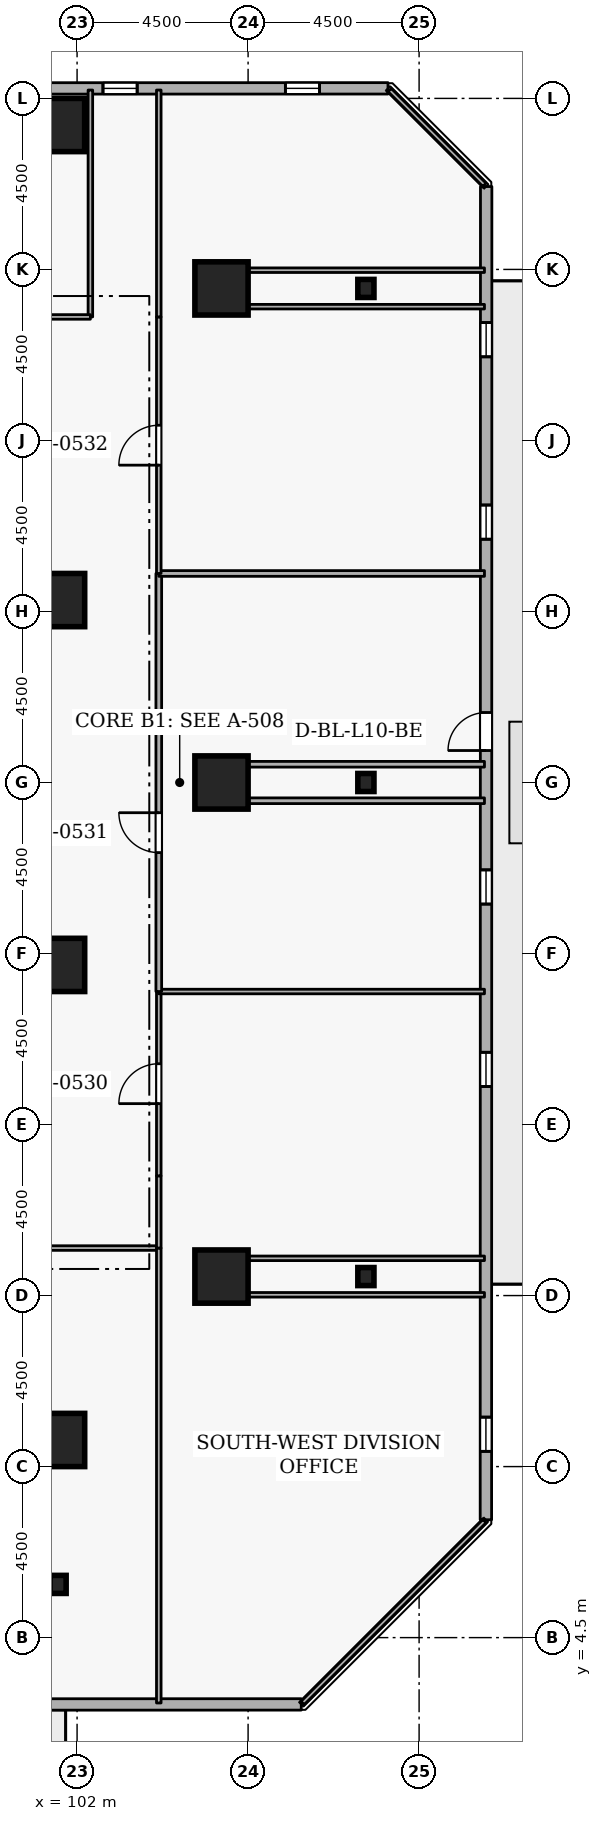
"""IFC4 building model, lengths in metres.
Left out: names, types, materials, properties, quantities, classifications, styles, units other than length and angle.
Written with IfcOpenShell. Run it as: python <this file> out.ifc"""

import sys

from ifc_helpers import new_model, si_unit, direction, frame, frame_2d, origin, origin_2d, place, context, subcontext, project, spatial, rectangle, i_section, extrude, element, fill, save


model = new_model("IFC4")
c1 = context("Model", 3, precision=1e-05, world=origin(), true_north=direction((0.0, 1.0)))
c2 = subcontext(c1, "Body", "Model", "MODEL_VIEW")
j1 = project(units=[si_unit("LENGTHUNIT", "METRE"), si_unit("PLANEANGLEUNIT", "RADIAN")], contexts=[c1])
p1 = place(None, origin())
s1 = spatial("IfcSite", under=j1, at=p1, CompositionType="ELEMENT")
p2 = place(p1, origin())
s2 = spatial("IfcBuilding", under=s1, at=p2, CompositionType="ELEMENT")
p3 = place(p2, frame((0.0, 0.0, 42.3)))
s3 = spatial("IfcBuildingStorey", under=s2, at=p3, CompositionType="ELEMENT", Elevation=42.3)
for number, where, z_axis, x_axis in (
    (1, (105.8, 14.0, 0.0), (0.0, 0.0, 1.0), (1.0, 0.0, 0.0)),
    (2, (105.8, 27.0, 0.0), (0.0, 0.0, 1.0), (1.0, 0.0, 0.0)),
    (3, (105.8, 40.0, 0.0), (0.0, 0.0, 1.0), (1.0, 0.0, 0.0)),
    (4, (101.5, 44.3, 0.0), (0.0, 0.0, 1.0), (1.0, 0.0, 0.0)),
    (5, (101.5, 9.7, 0.0), (0.0, 0.0, 1.0), (1.0, 0.0, 0.0)),
    (6, (101.5, 22.2, 0.0), (0.0, 0.0, 1.0), (1.0, 0.0, 0.0)),
    (7, (101.5, 31.8, 0.0), (0.0, 0.0, 1.0), (1.0, 0.0, 0.0)),
):
    element("IfcColumn", number, at=place(p3, frame(where, z_axis=z_axis, x_axis=x_axis)), inside=s3, PredefinedType="COLUMN", context=c2, shape_type="SweptSolid", body=[
        extrude(rectangle(XDim=1.4, YDim=1.4, at=origin_2d()), origin(), (0.0, 0.0, 1.0), 3.6),
    ])
for number, where, z_axis, x_axis in (
    (8, (109.6, 14.0, 0.0), (0.0, 0.0, 1.0), (1.0, 0.0, 0.0)),
    (9, (109.6, 27.0, 0.0), (0.0, 0.0, 1.0), (1.0, 0.0, 0.0)),
    (10, (109.6, 40.0, 0.0), (0.0, 0.0, 1.0), (1.0, 0.0, 0.0)),
    (11, (101.5, 5.9, 0.0), (0.0, 0.0, 1.0), (1.0, 0.0, 0.0)),
):
    element("IfcColumn", number, at=place(p3, frame(where, z_axis=z_axis, x_axis=x_axis)), inside=s3, PredefinedType="COLUMN", context=c2, shape_type="SweptSolid", body=[
        extrude(i_section(OverallWidth=0.424, OverallDepth=0.475, WebThickness=0.048, FlangeThickness=0.077, FilletRadius=0.015, at=origin_2d()), origin(), (0.0, 0.0, 1.0), 3.6),
    ])
p4 = place(p3, frame((72.819, 2.735, 0.0), z_axis=(0.0, 0.0, 1.0), x_axis=(0.999999978205, 0.000208784245, 0.0)))
e12 = element("IfcWall", 12, at=p4, inside=s3, PredefinedType="STANDARD", context=c2, shape_type="SweptSolid", body=[
    extrude(rectangle(XDim=35.08, YDim=0.3, at=frame_2d((17.54, 0.0))), origin(), (0.0, 0.0, 1.0), 2.7),
])
p5 = place(p4, frame((19.34, 0.0, 0.0)))
e13 = element("IfcOpeningElement", 13, at=p5, cuts=e12, PredefinedType="OPENING", context=c2, shape_type="SweptSolid", body=[
    extrude(rectangle(XDim=1.0, YDim=2.08, at=frame_2d((0.5, 1.04))), frame((0.0, 0.16, 0.0), z_axis=(0.0, -1.0, 0.0), x_axis=(1.0, 0.0, 0.0)), (0.0, 0.0, 1.0), 0.32),
])
p6 = place(p4, frame((1.8, 0.0, 0.72)))
e14 = element("IfcOpeningElement", 14, at=p6, cuts=e12, PredefinedType="OPENING", context=c2, shape_type="SweptSolid", body=[
    extrude(rectangle(XDim=0.9, YDim=1.75, at=frame_2d((0.45, 0.875))), frame((0.0, 0.16, 0.0), z_axis=(0.0, -1.0, 0.0), x_axis=(1.0, 0.0, 0.0)), (0.0, 0.0, 1.0), 0.32),
])
p7 = place(p4, frame((6.6, 0.0, 0.72)))
e15 = element("IfcOpeningElement", 15, at=p7, cuts=e12, PredefinedType="OPENING", context=c2, shape_type="SweptSolid", body=[
    extrude(rectangle(XDim=0.9, YDim=1.75, at=frame_2d((0.45, 0.875))), frame((0.0, 0.16, 0.0), z_axis=(0.0, -1.0, 0.0), x_axis=(1.0, 0.0, 0.0)), (0.0, 0.0, 1.0), 0.32),
])
p8 = place(p4, frame((11.4, 0.0, 0.72)))
e16 = element("IfcOpeningElement", 16, at=p8, cuts=e12, PredefinedType="OPENING", context=c2, shape_type="SweptSolid", body=[
    extrude(rectangle(XDim=0.9, YDim=1.75, at=frame_2d((0.45, 0.875))), frame((0.0, 0.16, 0.0), z_axis=(0.0, -1.0, 0.0), x_axis=(1.0, 0.0, 0.0)), (0.0, 0.0, 1.0), 0.32),
])
p9 = place(p4, frame((16.2, 0.0, 0.72)))
e17 = element("IfcOpeningElement", 17, at=p9, cuts=e12, PredefinedType="OPENING", context=c2, shape_type="SweptSolid", body=[
    extrude(rectangle(XDim=0.9, YDim=1.75, at=frame_2d((0.45, 0.875))), frame((0.0, 0.16, 0.0), z_axis=(0.0, -1.0, 0.0), x_axis=(1.0, 0.0, 0.0)), (0.0, 0.0, 1.0), 0.32),
])
p10 = place(p4, frame((25.8, 0.0, 0.72)))
e18 = element("IfcOpeningElement", 18, at=p10, cuts=e12, PredefinedType="OPENING", context=c2, shape_type="SweptSolid", body=[
    extrude(rectangle(XDim=0.9, YDim=1.75, at=frame_2d((0.45, 0.875))), frame((0.0, 0.16, 0.0), z_axis=(0.0, -1.0, 0.0), x_axis=(1.0, 0.0, 0.0)), (0.0, 0.0, 1.0), 0.32),
])
p11 = place(p3, frame((112.758, 7.601, 0.0), z_axis=(0.0, 0.0, 1.0), x_axis=(0.000208784245, 0.999999978205, 0.0)))
e19 = element("IfcWall", 19, at=p11, inside=s3, PredefinedType="STANDARD", context=c2, shape_type="SweptSolid", body=[
    extrude(rectangle(XDim=35.08, YDim=0.3, at=frame_2d((17.54, 0.0))), origin(), (0.0, 0.0, 1.0), 2.7),
])
p12 = place(p11, frame((20.24, 0.0, 0.0)))
e20 = element("IfcOpeningElement", 20, at=p12, cuts=e19, PredefinedType="OPENING", context=c2, shape_type="SweptSolid", body=[
    extrude(rectangle(XDim=1.0, YDim=2.08, at=frame_2d((0.5, 1.04))), frame((0.0, 0.16, 0.0), z_axis=(0.0, -1.0, 0.0), x_axis=(1.0, 0.0, 0.0)), (0.0, 0.0, 1.0), 0.32),
])
p13 = place(p11, frame((1.8, 0.0, 0.72)))
e21 = element("IfcOpeningElement", 21, at=p13, cuts=e19, PredefinedType="OPENING", context=c2, shape_type="SweptSolid", body=[
    extrude(rectangle(XDim=0.9, YDim=1.75, at=frame_2d((0.45, 0.875))), frame((0.0, 0.16, 0.0), z_axis=(0.0, -1.0, 0.0), x_axis=(1.0, 0.0, 0.0)), (0.0, 0.0, 1.0), 0.32),
])
p14 = place(p11, frame((11.4, 0.0, 0.72)))
e22 = element("IfcOpeningElement", 22, at=p14, cuts=e19, PredefinedType="OPENING", context=c2, shape_type="SweptSolid", body=[
    extrude(rectangle(XDim=0.9, YDim=1.75, at=frame_2d((0.45, 0.875))), frame((0.0, 0.16, 0.0), z_axis=(0.0, -1.0, 0.0), x_axis=(1.0, 0.0, 0.0)), (0.0, 0.0, 1.0), 0.32),
])
p15 = place(p11, frame((16.2, 0.0, 0.72)))
e23 = element("IfcOpeningElement", 23, at=p15, cuts=e19, PredefinedType="OPENING", context=c2, shape_type="SweptSolid", body=[
    extrude(rectangle(XDim=0.9, YDim=1.75, at=frame_2d((0.45, 0.875))), frame((0.0, 0.16, 0.0), z_axis=(0.0, -1.0, 0.0), x_axis=(1.0, 0.0, 0.0)), (0.0, 0.0, 1.0), 0.32),
])
p16 = place(p11, frame((25.8, 0.0, 0.72)))
e24 = element("IfcOpeningElement", 24, at=p16, cuts=e19, PredefinedType="OPENING", context=c2, shape_type="SweptSolid", body=[
    extrude(rectangle(XDim=0.9, YDim=1.75, at=frame_2d((0.45, 0.875))), frame((0.0, 0.16, 0.0), z_axis=(0.0, -1.0, 0.0), x_axis=(1.0, 0.0, 0.0)), (0.0, 0.0, 1.0), 0.32),
])
p17 = place(p11, frame((30.6, 0.0, 0.72)))
e25 = element("IfcOpeningElement", 25, at=p17, cuts=e19, PredefinedType="OPENING", context=c2, shape_type="SweptSolid", body=[
    extrude(rectangle(XDim=0.9, YDim=1.75, at=frame_2d((0.45, 0.875))), frame((0.0, 0.16, 0.0), z_axis=(0.0, -1.0, 0.0), x_axis=(1.0, 0.0, 0.0)), (0.0, 0.0, 1.0), 0.32),
])
p18 = place(p3, frame((110.181, 45.265, 0.0), z_axis=(0.0, 0.0, 1.0), x_axis=(-0.999999978205, -0.000208784245, 0.0)))
e26 = element("IfcWall", 26, at=p18, inside=s3, PredefinedType="STANDARD", context=c2, shape_type="SweptSolid", body=[
    extrude(rectangle(XDim=35.08, YDim=0.3, at=frame_2d((17.54, 0.0))), origin(), (0.0, 0.0, 1.0), 2.7),
])
p19 = place(p18, frame((1.8, 0.0, 0.72)))
e27 = element("IfcOpeningElement", 27, at=p19, cuts=e26, PredefinedType="OPENING", context=c2, shape_type="SweptSolid", body=[
    extrude(rectangle(XDim=0.9, YDim=1.75, at=frame_2d((0.45, 0.875))), frame((0.0, 0.16, 0.0), z_axis=(0.0, -1.0, 0.0), x_axis=(1.0, 0.0, 0.0)), (0.0, 0.0, 1.0), 0.32),
])
p20 = place(p18, frame((6.6, 0.0, 0.72)))
e28 = element("IfcOpeningElement", 28, at=p20, cuts=e26, PredefinedType="OPENING", context=c2, shape_type="SweptSolid", body=[
    extrude(rectangle(XDim=0.9, YDim=1.75, at=frame_2d((0.45, 0.875))), frame((0.0, 0.16, 0.0), z_axis=(0.0, -1.0, 0.0), x_axis=(1.0, 0.0, 0.0)), (0.0, 0.0, 1.0), 0.32),
])
p21 = place(p18, frame((11.4, 0.0, 0.72)))
e29 = element("IfcOpeningElement", 29, at=p21, cuts=e26, PredefinedType="OPENING", context=c2, shape_type="SweptSolid", body=[
    extrude(rectangle(XDim=0.9, YDim=1.75, at=frame_2d((0.45, 0.875))), frame((0.0, 0.16, 0.0), z_axis=(0.0, -1.0, 0.0), x_axis=(1.0, 0.0, 0.0)), (0.0, 0.0, 1.0), 0.32),
])
p22 = place(p18, frame((16.2, 0.0, 0.72)))
e30 = element("IfcOpeningElement", 30, at=p22, cuts=e26, PredefinedType="OPENING", context=c2, shape_type="SweptSolid", body=[
    extrude(rectangle(XDim=0.9, YDim=1.75, at=frame_2d((0.45, 0.875))), frame((0.0, 0.16, 0.0), z_axis=(0.0, -1.0, 0.0), x_axis=(1.0, 0.0, 0.0)), (0.0, 0.0, 1.0), 0.32),
])
p23 = place(p18, frame((25.8, 0.0, 0.72)))
e31 = element("IfcOpeningElement", 31, at=p23, cuts=e26, PredefinedType="OPENING", context=c2, shape_type="SweptSolid", body=[
    extrude(rectangle(XDim=0.9, YDim=1.75, at=frame_2d((0.45, 0.875))), frame((0.0, 0.16, 0.0), z_axis=(0.0, -1.0, 0.0), x_axis=(1.0, 0.0, 0.0)), (0.0, 0.0, 1.0), 0.32),
])
p24 = place(p18, frame((30.6, 0.0, 0.72)))
e32 = element("IfcOpeningElement", 32, at=p24, cuts=e26, PredefinedType="OPENING", context=c2, shape_type="SweptSolid", body=[
    extrude(rectangle(XDim=0.9, YDim=1.75, at=frame_2d((0.45, 0.875))), frame((0.0, 0.16, 0.0), z_axis=(0.0, -1.0, 0.0), x_axis=(1.0, 0.0, 0.0)), (0.0, 0.0, 1.0), 0.32),
])
p25 = place(p3, frame((94.8, 14.75, 0.0), z_axis=(0.0, 0.0, 1.0), x_axis=(1.0, 0.0, 0.0)))
e33 = element("IfcWall", 33, at=p25, inside=s3, PredefinedType="PARTITIONING", context=c2, shape_type="SweptSolid", body=[
    extrude(rectangle(XDim=9.35, YDim=0.12, at=frame_2d((4.675, 0.0))), origin(), (0.0, 0.0, 1.0), 3.34),
])
p26 = place(p25, frame((4.15, 0.0, 0.0)))
e34 = element("IfcOpeningElement", 34, at=p26, cuts=e33, PredefinedType="OPENING", context=c2, shape_type="SweptSolid", body=[
    extrude(rectangle(XDim=1.05, YDim=2.1, at=frame_2d((0.525, 1.05))), frame((0.0, 0.07, 0.0), z_axis=(0.0, -1.0, 0.0), x_axis=(1.0, 0.0, 0.0)), (0.0, 0.0, 1.0), 0.14),
])
p27 = place(p3, frame((104.15, 14.75, 0.0), z_axis=(0.0, 0.0, 1.0), x_axis=(0.0, -1.0, 0.0)))
e35 = element("IfcWall", 35, at=p27, inside=s3, PredefinedType="PARTITIONING", context=c2, shape_type="SweptSolid", body=[
    extrude(rectangle(XDim=11.97, YDim=0.12, at=frame_2d((5.985, 0.0))), origin(), (0.0, 0.0, 1.0), 3.34),
])
p28 = place(p3, frame((102.35, 45.22, 0.0), z_axis=(0.0, 0.0, 1.0), x_axis=(0.0, -1.0, 0.0)))
e36 = element("IfcWall", 36, at=p28, inside=s3, PredefinedType="PARTITIONING", context=c2, shape_type="SweptSolid", body=[
    extrude(rectangle(XDim=5.97, YDim=0.12, at=frame_2d((2.985, 0.0))), origin(), (0.0, 0.0, 1.0), 3.34),
])
p29 = place(p3, frame((102.35, 39.25, 0.0), z_axis=(0.0, 0.0, 1.0), x_axis=(-1.0, 0.0, 0.0)))
e37 = element("IfcWall", 37, at=p29, inside=s3, PredefinedType="PARTITIONING", context=c2, shape_type="SweptSolid", body=[
    extrude(rectangle(XDim=1.862, YDim=0.12, at=frame_2d((0.931, 0.0))), origin(), (0.0, 0.0, 1.0), 3.34),
])
p30 = place(p3, frame((104.15, 14.75, 0.0), z_axis=(0.0, 0.0, 1.0), x_axis=(0.0, 1.0, 0.0)))
e38 = element("IfcWall", 38, at=p30, inside=s3, PredefinedType="PARTITIONING", context=c2, shape_type="SweptSolid", body=[
    extrude(rectangle(XDim=1.9, YDim=0.12, at=frame_2d((0.95, 0.0))), origin(), (0.0, 0.0, 1.0), 3.34),
])
p31 = place(p3, frame((104.15, 16.65, 0.0), z_axis=(0.0, 0.0, 1.0), x_axis=(0.0, 1.0, 0.0)))
e39 = element("IfcWall", 39, at=p31, inside=s3, PredefinedType="PARTITIONING", context=c2, shape_type="SweptSolid", body=[
    extrude(rectangle(XDim=4.85, YDim=0.12, at=frame_2d((2.425, 0.0))), origin(), (0.0, 0.0, 1.0), 3.34),
])
p32 = place(p31, frame((1.9, 0.0, 0.0)))
e40 = element("IfcOpeningElement", 40, at=p32, cuts=e39, PredefinedType="OPENING", context=c2, shape_type="SweptSolid", body=[
    extrude(rectangle(XDim=1.05, YDim=2.1, at=frame_2d((0.525, 1.05))), frame((0.0, 0.07, 0.0), z_axis=(0.0, -1.0, 0.0), x_axis=(1.0, 0.0, 0.0)), (0.0, 0.0, 1.0), 0.14),
])
p33 = place(p3, frame((104.15, 21.5, 0.0), z_axis=(0.0, 0.0, 1.0), x_axis=(1.0, 0.0, 0.0)))
e41 = element("IfcWall", 41, at=p33, inside=s3, PredefinedType="PARTITIONING", context=c2, shape_type="SweptSolid", body=[
    extrude(rectangle(XDim=8.57, YDim=0.12, at=frame_2d((4.285, 0.0))), origin(), (0.0, 0.0, 1.0), 3.34),
])
p34 = place(p3, frame((112.72, 14.48, 0.0), z_axis=(0.0, 0.0, 1.0), x_axis=(-1.0, 0.0, 0.0)))
e42 = element("IfcWall", 42, at=p34, inside=s3, PredefinedType="PARTITIONING", context=c2, shape_type="SweptSolid", body=[
    extrude(rectangle(XDim=6.92, YDim=0.12, at=frame_2d((3.46, 0.0))), origin(), (0.0, 0.0, 1.0), 3.34),
])
p35 = place(p3, frame((105.8, 13.52, 0.0), z_axis=(0.0, 0.0, 1.0), x_axis=(1.0, 0.0, 0.0)))
e43 = element("IfcWall", 43, at=p35, inside=s3, PredefinedType="PARTITIONING", context=c2, shape_type="SweptSolid", body=[
    extrude(rectangle(XDim=6.92, YDim=0.12, at=frame_2d((3.46, 0.0))), origin(), (0.0, 0.0, 1.0), 2.895),
])
p36 = place(p3, frame((112.72, 7.566, 0.0), z_axis=(0.0, 0.0, 1.0), x_axis=(-0.707106781187, -0.707106781187, 0.0)))
e44 = element("IfcWall", 44, at=p36, inside=s3, PredefinedType="PARTITIONING", context=c2, shape_type="SweptSolid", body=[
    extrude(rectangle(XDim=6.768, YDim=0.12, at=frame_2d((3.384, 0.0))), origin(), (0.0, 0.0, 1.0), 3.34),
])
p37 = place(p3, frame((104.15, 21.5, 0.0), z_axis=(0.0, 0.0, 1.0), x_axis=(0.0, 1.0, 0.0)))
e45 = element("IfcWall", 45, at=p37, inside=s3, PredefinedType="PARTITIONING", context=c2, shape_type="SweptSolid", body=[
    extrude(rectangle(XDim=11.0, YDim=0.15, at=frame_2d((5.5, 0.0))), origin(), (0.0, 0.0, 1.0), 3.34),
])
p38 = place(p37, frame((3.655, 0.0, 0.0)))
e46 = element("IfcOpeningElement", 46, at=p38, cuts=e45, PredefinedType="OPENING", context=c2, shape_type="SweptSolid", body=[
    extrude(rectangle(XDim=1.05, YDim=2.1, at=frame_2d((0.525, 1.05))), frame((0.0, 0.085, 0.0), z_axis=(0.0, -1.0, 0.0), x_axis=(1.0, 0.0, 0.0)), (0.0, 0.0, 1.0), 0.17),
])
p39 = place(p3, frame((104.15, 32.5, 0.0), z_axis=(0.0, 0.0, 1.0), x_axis=(1.0, 0.0, 0.0)))
e47 = element("IfcWall", 47, at=p39, inside=s3, PredefinedType="PARTITIONING", context=c2, shape_type="SweptSolid", body=[
    extrude(rectangle(XDim=8.57, YDim=0.15, at=frame_2d((4.285, 0.0))), origin(), (0.0, 0.0, 1.0), 3.34),
])
for number, where, z_axis, x_axis in (
    (48, (112.72, 27.48, 0.0), (0.0, 0.0, 1.0), (-1.0, 0.0, 0.0)),
    (49, (105.8, 26.52, 0.0), (0.0, 0.0, 1.0), (1.0, 0.0, 0.0)),
):
    element("IfcWall", number, at=place(p3, frame(where, z_axis=z_axis, x_axis=x_axis)), inside=s3, PredefinedType="PARTITIONING", context=c2, shape_type="SweptSolid", body=[
        extrude(rectangle(XDim=6.92, YDim=0.15, at=frame_2d((3.46, 0.0))), origin(), (0.0, 0.0, 1.0), 3.34),
    ])
p40 = place(p3, frame((104.15, 32.5, 0.0), z_axis=(0.0, 0.0, 1.0), x_axis=(0.0, 1.0, 0.0)))
e50 = element("IfcWall", 50, at=p40, inside=s3, PredefinedType="PARTITIONING", context=c2, shape_type="SweptSolid", body=[
    extrude(rectangle(XDim=6.75, YDim=0.12, at=frame_2d((3.375, 0.0))), origin(), (0.0, 0.0, 1.0), 3.34),
])
p41 = place(p40, frame((2.85, 0.0, 0.0)))
e51 = element("IfcOpeningElement", 51, at=p41, cuts=e50, PredefinedType="OPENING", context=c2, shape_type="SweptSolid", body=[
    extrude(rectangle(XDim=1.05, YDim=2.1, at=frame_2d((0.525, 1.05))), frame((0.0, 0.07, 0.0), z_axis=(0.0, -1.0, 0.0), x_axis=(1.0, 0.0, 0.0)), (0.0, 0.0, 1.0), 0.14),
])
p42 = place(p3, frame((104.15, 39.25, 0.0), z_axis=(0.0, 0.0, 1.0), x_axis=(0.0, 1.0, 0.0)))
e52 = element("IfcWall", 52, at=p42, inside=s3, PredefinedType="PARTITIONING", context=c2, shape_type="SweptSolid", body=[
    extrude(rectangle(XDim=5.97, YDim=0.12, at=frame_2d((2.985, 0.0))), origin(), (0.0, 0.0, 1.0), 3.34),
])
p43 = place(p3, frame((110.225, 45.22, 0.0), z_axis=(0.0, 0.0, 1.0), x_axis=(0.707106781187, -0.707106781187, 0.0)))
e53 = element("IfcWall", 53, at=p43, inside=s3, PredefinedType="PARTITIONING", context=c2, shape_type="SweptSolid", body=[
    extrude(rectangle(XDim=3.528, YDim=0.12, at=frame_2d((1.764, 0.0))), origin(), (0.0, 0.0, 1.0), 3.34),
])
for number, where, z_axis, x_axis in (
    (54, (112.72, 40.48, 0.0), (0.0, 0.0, 1.0), (-1.0, 0.0, 0.0)),
    (55, (105.8, 39.52, 0.0), (0.0, 0.0, 1.0), (1.0, 0.0, 0.0)),
):
    element("IfcWall", number, at=place(p3, frame(where, z_axis=z_axis, x_axis=x_axis)), inside=s3, PredefinedType="PARTITIONING", context=c2, shape_type="SweptSolid", body=[
        extrude(rectangle(XDim=6.92, YDim=0.12, at=frame_2d((3.46, 0.0))), origin(), (0.0, 0.0, 1.0), 3.34),
    ])
p44 = place(p12, origin())
e56 = element("IfcDoor", 56, at=p44, inside=s3, OperationType="SINGLE_SWING_LEFT", PredefinedType="DOOR", context=c2, shape_type="SweptSolid", body=[
    extrude(rectangle(XDim=1.0, YDim=2.08, at=frame_2d((0.5, 1.04))), frame((0.0, 0.025, 0.0), z_axis=(0.0, -1.0, 0.0), x_axis=(1.0, 0.0, 0.0)), (0.0, 0.0, 1.0), 0.05),
])
fill(e20, e56)
p45 = place(p13, origin())
e57 = element("IfcWindow", 57, at=p45, inside=s3, PartitioningType="SINGLE_PANEL", PredefinedType="WINDOW", context=c2, shape_type="SweptSolid", body=[
    extrude(rectangle(XDim=0.9, YDim=1.75, at=frame_2d((0.45, 0.875))), frame((0.0, 0.03, 0.0), z_axis=(0.0, -1.0, 0.0), x_axis=(1.0, 0.0, 0.0)), (0.0, 0.0, 1.0), 0.06),
])
fill(e21, e57)
p46 = place(p14, origin())
e58 = element("IfcWindow", 58, at=p46, inside=s3, PartitioningType="SINGLE_PANEL", PredefinedType="WINDOW", context=c2, shape_type="SweptSolid", body=[
    extrude(rectangle(XDim=0.9, YDim=1.75, at=frame_2d((0.45, 0.875))), frame((0.0, 0.03, 0.0), z_axis=(0.0, -1.0, 0.0), x_axis=(1.0, 0.0, 0.0)), (0.0, 0.0, 1.0), 0.06),
])
fill(e22, e58)
p47 = place(p15, origin())
e59 = element("IfcWindow", 59, at=p47, inside=s3, PartitioningType="SINGLE_PANEL", PredefinedType="WINDOW", context=c2, shape_type="SweptSolid", body=[
    extrude(rectangle(XDim=0.9, YDim=1.75, at=frame_2d((0.45, 0.875))), frame((0.0, 0.03, 0.0), z_axis=(0.0, -1.0, 0.0), x_axis=(1.0, 0.0, 0.0)), (0.0, 0.0, 1.0), 0.06),
])
fill(e23, e59)
p48 = place(p16, origin())
e60 = element("IfcWindow", 60, at=p48, inside=s3, PartitioningType="SINGLE_PANEL", PredefinedType="WINDOW", context=c2, shape_type="SweptSolid", body=[
    extrude(rectangle(XDim=0.9, YDim=1.75, at=frame_2d((0.45, 0.875))), frame((0.0, 0.03, 0.0), z_axis=(0.0, -1.0, 0.0), x_axis=(1.0, 0.0, 0.0)), (0.0, 0.0, 1.0), 0.06),
])
fill(e24, e60)
p49 = place(p17, origin())
e61 = element("IfcWindow", 61, at=p49, inside=s3, PartitioningType="SINGLE_PANEL", PredefinedType="WINDOW", context=c2, shape_type="SweptSolid", body=[
    extrude(rectangle(XDim=0.9, YDim=1.75, at=frame_2d((0.45, 0.875))), frame((0.0, 0.03, 0.0), z_axis=(0.0, -1.0, 0.0), x_axis=(1.0, 0.0, 0.0)), (0.0, 0.0, 1.0), 0.06),
])
fill(e25, e61)
p50 = place(p19, origin())
e62 = element("IfcWindow", 62, at=p50, inside=s3, PartitioningType="SINGLE_PANEL", PredefinedType="WINDOW", context=c2, shape_type="SweptSolid", body=[
    extrude(rectangle(XDim=0.9, YDim=1.75, at=frame_2d((0.45, 0.875))), frame((0.0, 0.03, 0.0), z_axis=(0.0, -1.0, 0.0), x_axis=(1.0, 0.0, 0.0)), (0.0, 0.0, 1.0), 0.06),
])
fill(e27, e62)
p51 = place(p20, origin())
e63 = element("IfcWindow", 63, at=p51, inside=s3, PartitioningType="SINGLE_PANEL", PredefinedType="WINDOW", context=c2, shape_type="SweptSolid", body=[
    extrude(rectangle(XDim=0.9, YDim=1.75, at=frame_2d((0.45, 0.875))), frame((0.0, 0.03, 0.0), z_axis=(0.0, -1.0, 0.0), x_axis=(1.0, 0.0, 0.0)), (0.0, 0.0, 1.0), 0.06),
])
fill(e28, e63)
p52 = place(p32, origin())
e64 = element("IfcDoor", 64, at=p52, inside=s3, OperationType="SINGLE_SWING_LEFT", PredefinedType="DOOR", context=c2, shape_type="SweptSolid", body=[
    extrude(rectangle(XDim=1.05, YDim=2.1, at=frame_2d((0.525, 1.05))), frame((0.0, 0.025, 0.0), z_axis=(0.0, -1.0, 0.0), x_axis=(1.0, 0.0, 0.0)), (0.0, 0.0, 1.0), 0.05),
])
fill(e40, e64)
p53 = place(p38, origin())
e65 = element("IfcDoor", 65, at=p53, inside=s3, OperationType="SINGLE_SWING_RIGHT", PredefinedType="DOOR", context=c2, shape_type="SweptSolid", body=[
    extrude(rectangle(XDim=1.05, YDim=2.1, at=frame_2d((0.525, 1.05))), frame((0.0, 0.025, 0.0), z_axis=(0.0, -1.0, 0.0), x_axis=(1.0, 0.0, 0.0)), (0.0, 0.0, 1.0), 0.05),
])
fill(e46, e65)
p54 = place(p41, origin())
e66 = element("IfcDoor", 66, at=p54, inside=s3, OperationType="SINGLE_SWING_LEFT", PredefinedType="DOOR", context=c2, shape_type="SweptSolid", body=[
    extrude(rectangle(XDim=1.05, YDim=2.1, at=frame_2d((0.525, 1.05))), frame((0.0, 0.025, 0.0), z_axis=(0.0, -1.0, 0.0), x_axis=(1.0, 0.0, 0.0)), (0.0, 0.0, 1.0), 0.05),
])
fill(e51, e66)
save(model, sys.argv[1])
